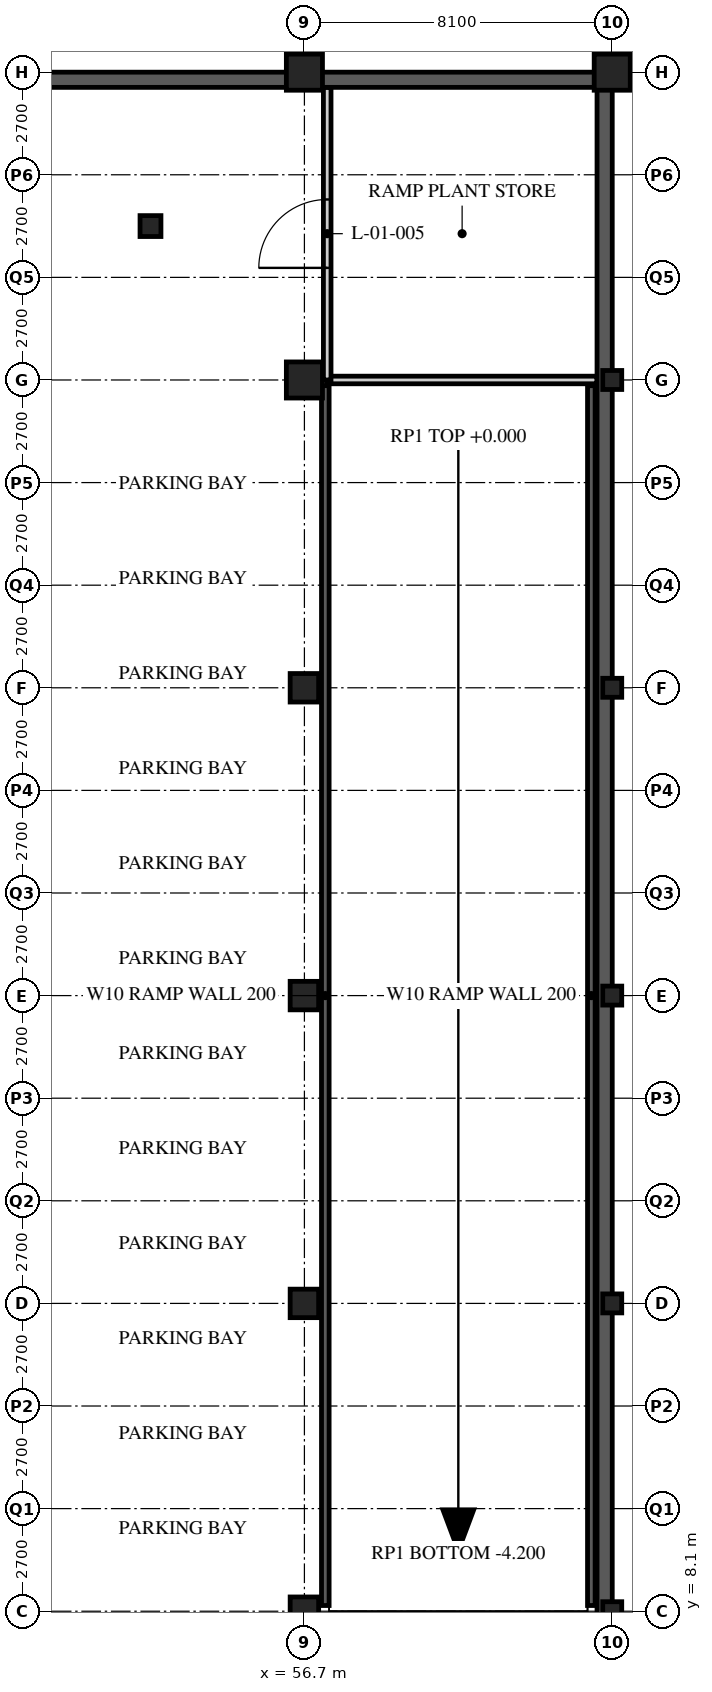
"""IFC4 building model, lengths in metres.
Left out: names, types, materials, properties, quantities, classifications, styles, units other than length and angle.
Written with IfcOpenShell. Run it as: python <this file> out.ifc"""

import sys

from ifc_helpers import new_model, si_unit, direction, frame, frame_2d, origin, origin_2d, place, context, subcontext, project, spatial, rectangle, hollow_rectangle, extrude, element, fill, save


model = new_model("IFC4")
c1 = context("Model", 3, precision=1e-05, world=origin(), true_north=direction((0.0, 1.0)))
c2 = subcontext(c1, "Body", "Model", "MODEL_VIEW")
j1 = project(units=[si_unit("LENGTHUNIT", "METRE"), si_unit("PLANEANGLEUNIT", "RADIAN")], contexts=[c1])
p1 = place(None, origin())
s1 = spatial("IfcSite", under=j1, at=p1, CompositionType="ELEMENT")
p2 = place(p1, origin())
s2 = spatial("IfcBuilding", under=s1, at=p2, CompositionType="ELEMENT")
p3 = place(p2, frame((0.0, 0.0, -4.2)))
s3 = spatial("IfcBuildingStorey", under=s2, at=p3, CompositionType="ELEMENT", Elevation=-4.2)
p4 = place(p3, frame((52.65, 44.55, 0.0), z_axis=(0.0, 0.0, 1.0), x_axis=(1.0, 0.0, 0.0)))
e1 = element("IfcColumn", 1, at=p4, inside=s3, PredefinedType="COLUMN", context=c2, shape_type="SweptSolid", body=[
    extrude(hollow_rectangle(XDim=0.55, YDim=0.55, WallThickness=0.05, at=origin_2d()), origin(), (0.0, 0.0, 1.0), 4.2),
])
for number, where, z_axis, x_axis in (
    (2, (56.7, 8.1, 0.0), (0.0, 0.0, 1.0), (1.0, 0.0, 0.0)),
    (3, (56.7, 16.2, 0.0), (0.0, 0.0, 1.0), (1.0, 0.0, 0.0)),
    (4, (56.7, 24.3, 0.0), (0.0, 0.0, 1.0), (1.0, 0.0, 0.0)),
    (5, (56.7, 32.4, 0.0), (0.0, 0.0, 1.0), (1.0, 0.0, 0.0)),
):
    element("IfcColumn", number, at=place(p3, frame(where, z_axis=z_axis, x_axis=x_axis)), inside=s3, PredefinedType="COLUMN", context=c2, shape_type="SweptSolid", body=[
        extrude(hollow_rectangle(XDim=0.75, YDim=0.75, WallThickness=0.07, at=origin_2d()), origin(), (0.0, 0.0, 1.0), 4.2),
    ])
for number, where, z_axis, x_axis in (
    (6, (56.7, 40.5, 0.0), (0.0, 0.0, 1.0), (1.0, 0.0, 0.0)),
    (7, (56.7, 48.6, 0.0), (0.0, 0.0, 1.0), (1.0, 0.0, 0.0)),
):
    element("IfcColumn", number, at=place(p3, frame(where, z_axis=z_axis, x_axis=x_axis)), inside=s3, PredefinedType="COLUMN", context=c2, shape_type="SweptSolid", body=[
        extrude(hollow_rectangle(XDim=0.95, YDim=0.95, WallThickness=0.1, at=origin_2d()), origin(), (0.0, 0.0, 1.0), 4.2),
    ])
for number, where, z_axis, x_axis in (
    (8, (64.8, 8.1, 0.0), (0.0, 0.0, 1.0), (1.0, 0.0, 0.0)),
    (9, (64.8, 16.2, 0.0), (0.0, 0.0, 1.0), (1.0, 0.0, 0.0)),
    (10, (64.8, 24.3, 0.0), (0.0, 0.0, 1.0), (1.0, 0.0, 0.0)),
    (11, (64.8, 32.4, 0.0), (0.0, 0.0, 1.0), (1.0, 0.0, 0.0)),
    (12, (64.8, 40.5, 0.0), (0.0, 0.0, 1.0), (1.0, 0.0, 0.0)),
):
    element("IfcColumn", number, at=place(p3, frame(where, z_axis=z_axis, x_axis=x_axis)), inside=s3, PredefinedType="COLUMN", context=c2, shape_type="SweptSolid", body=[
        extrude(hollow_rectangle(XDim=0.5, YDim=0.5, WallThickness=0.03, at=origin_2d()), origin(), (0.0, 0.0, 1.0), 4.2),
    ])
p5 = place(p3, frame((64.8, 48.6, 0.0), z_axis=(0.0, 0.0, 1.0), x_axis=(1.0, 0.0, 0.0)))
e13 = element("IfcColumn", 13, at=p5, inside=s3, PredefinedType="COLUMN", context=c2, shape_type="SweptSolid", body=[
    extrude(hollow_rectangle(XDim=0.95, YDim=0.95, WallThickness=0.1, at=origin_2d()), origin(), (0.0, 0.0, 1.0), 4.2),
])
p6 = place(p3, frame((57.3, 40.5, 0.0), z_axis=(0.0, 0.0, 1.0), x_axis=(1.0, 0.0, 0.0)))
e14 = element("IfcWall", 14, at=p6, inside=s3, PredefinedType="SOLIDWALL", context=c2, shape_type="SweptSolid", body=[
    extrude(rectangle(XDim=7.1, YDim=0.2, at=frame_2d((3.55, 0.0))), origin(), (0.0, 0.0, 1.0), 3.338),
])
p7 = place(p3, frame((57.3, 40.5, 0.0), z_axis=(0.0, 0.0, 1.0), x_axis=(0.0, 1.0, 0.0)))
e15 = element("IfcWall", 15, at=p7, inside=s3, PredefinedType="SOLIDWALL", context=c2, shape_type="SweptSolid", body=[
    extrude(rectangle(XDim=7.7, YDim=0.2, at=frame_2d((3.85, 0.0))), origin(), (0.0, 0.0, 1.0), 3.95),
])
p8 = place(p7, frame((2.95, 0.0, 0.0)))
e16 = element("IfcOpeningElement", 16, at=p8, cuts=e15, PredefinedType="OPENING", context=c2, shape_type="SweptSolid", body=[
    extrude(rectangle(XDim=1.8, YDim=2.4, at=frame_2d((0.9, 1.2))), frame((0.0, 0.11, 0.0), z_axis=(0.0, -1.0, 0.0), x_axis=(1.0, 0.0, 0.0)), (0.0, 0.0, 1.0), 0.22),
])
p9 = place(p3, frame((64.6, -7.9, 0.0), z_axis=(0.0, 0.0, 1.0), x_axis=(0.0, 1.0, 0.0)))
e17 = element("IfcWall", 17, at=p9, inside=s3, PredefinedType="SOLIDWALL", context=c2, shape_type="SweptSolid", body=[
    extrude(rectangle(XDim=56.3, YDim=0.4, at=frame_2d((28.15, 0.0))), origin(), (0.0, 0.0, 1.0), 3.338),
])
p10 = place(p3, frame((64.6, 48.4, 0.0), z_axis=(0.0, 0.0, 1.0), x_axis=(-1.0, 0.0, 0.0)))
e18 = element("IfcWall", 18, at=p10, inside=s3, PredefinedType="SOLIDWALL", context=c2, shape_type="SweptSolid", body=[
    extrude(rectangle(XDim=72.5, YDim=0.4, at=frame_2d((36.25, 0.0))), origin(), (0.0, 0.0, 1.0), 3.338),
])
for number, where, z_axis, x_axis in (
    (19, (64.25, 8.25, 0.0), (0.0, 0.0, 1.0), (0.0, 1.0, 0.0)),
    (20, (57.25, 8.25, 0.0), (0.0, 0.0, 1.0), (0.0, 1.0, 0.0)),
):
    element("IfcWall", number, at=place(p3, frame(where, z_axis=z_axis, x_axis=x_axis)), inside=s3, PredefinedType="PARTITIONING", context=c2, shape_type="SweptSolid", body=[
        extrude(rectangle(XDim=32.1, YDim=0.2, at=frame_2d((16.05, 0.0))), origin(), (0.0, 0.0, 1.0), 4.2),
    ])
p11 = place(p8, origin())
e21 = element("IfcDoor", 21, at=p11, inside=s3, OperationType="DOUBLE_DOOR_SINGLE_SWING", PredefinedType="DOOR", context=c2, shape_type="SweptSolid", body=[
    extrude(rectangle(XDim=1.8, YDim=2.4, at=frame_2d((0.9, 1.2))), frame((0.0, 0.025, 0.0), z_axis=(0.0, -1.0, 0.0), x_axis=(1.0, 0.0, 0.0)), (0.0, 0.0, 1.0), 0.05),
])
fill(e16, e21)
save(model, sys.argv[1])
